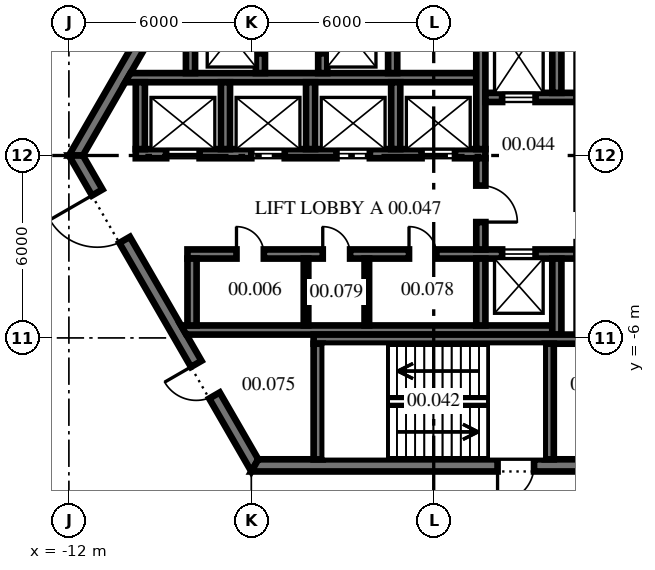
"""IFC4 building model, lengths in metres.
Left out: names, types, materials, properties, quantities, classifications, styles, units other than length and angle.
Written with IfcOpenShell. Run it as: python <this file> out.ifc"""

import sys

from ifc_helpers import new_model, si_unit, direction, frame, frame_2d, origin, place, context, subcontext, project, spatial, polyline, rectangle, outline, extrude, source, transform, mapped, element, fill, save


model = new_model("IFC4")
c1 = context("Model", 3, precision=1e-05, world=origin(), true_north=direction((0.0, 1.0)))
c2 = subcontext(c1, "Body", "Model", "MODEL_VIEW")
j1 = project(units=[si_unit("LENGTHUNIT", "METRE"), si_unit("PLANEANGLEUNIT", "RADIAN")], contexts=[c1])
p1 = place(None, origin())
s1 = spatial("IfcSite", under=j1, at=p1, CompositionType="ELEMENT")
p2 = place(p1, origin())
s2 = spatial("IfcBuilding", under=s1, at=p2, CompositionType="ELEMENT")
p3 = place(p2, origin())
s3 = spatial("IfcBuildingStorey", under=s2, at=p3, CompositionType="ELEMENT", Elevation=0.0)
m1 = source(origin(), c2, "Body", "SweptSolid", [
    extrude(outline(polyline([(-0.115, -0.2), (11.885, -0.2), (11.654, 0.2), (0.115, 0.2), (-0.115, -0.2)])), origin(), (0.0, 0.0, 1.0), 7.0),
])
p4 = place(p3, frame((-5.885, 10.192, -0.2), z_axis=(0.0, 0.0, 1.0), x_axis=(-0.499996592174, -0.866027371285, 0.0)))
e1 = element("IfcWall", 1, at=p4, inside=s3, PredefinedType="SHEAR", context=c2, shape_type="MappedRepresentation", body=[
    mapped(m1, transform((0.0, 0.0, 0.0), scale=1.0)),
])
p5 = place(p4, frame((3.185, 0.0, 0.2)))
e2 = element("IfcOpeningElement", 2, at=p5, cuts=e1, PredefinedType="OPENING", context=c2, shape_type="SweptSolid", body=[
    extrude(rectangle(XDim=1.2, YDim=2.1, at=frame_2d((0.6, 1.05))), frame((0.0, 0.21, 0.0), z_axis=(0.0, -1.0, 0.0), x_axis=(1.0, 0.0, 0.0)), (0.0, 0.0, 1.0), 0.42),
])
p6 = place(p3, frame((-11.769, 0.0, -0.2), z_axis=(0.0, 0.0, 1.0), x_axis=(0.499996592174, -0.866027371285, 0.0)))
e3 = element("IfcWall", 3, at=p6, inside=s3, PredefinedType="SHEAR", context=c2, shape_type="MappedRepresentation", body=[
    mapped(m1, transform((0.0, 0.0, 0.0), scale=1.0)),
])
p7 = place(p6, frame((1.405, 0.0, 0.2)))
e4 = element("IfcOpeningElement", 4, at=p7, cuts=e3, PredefinedType="OPENING", context=c2, shape_type="SweptSolid", body=[
    extrude(rectangle(XDim=1.8, YDim=2.1, at=frame_2d((0.9, 1.05))), frame((0.0, 0.21, 0.0), z_axis=(0.0, -1.0, 0.0), x_axis=(1.0, 0.0, 0.0)), (0.0, 0.0, 1.0), 0.42),
])
p8 = place(p6, frame((7.915, 0.0, 0.2)))
e5 = element("IfcOpeningElement", 5, at=p8, cuts=e3, PredefinedType="OPENING", context=c2, shape_type="SweptSolid", body=[
    extrude(rectangle(XDim=1.2, YDim=2.1, at=frame_2d((0.6, 1.05))), frame((0.0, 0.21, 0.0), z_axis=(0.0, -1.0, 0.0), x_axis=(1.0, 0.0, 0.0)), (0.0, 0.0, 1.0), 0.42),
])
p9 = place(p3, frame((-5.885, -10.192, -0.2), z_axis=(0.0, 0.0, 1.0), x_axis=(1.0, 0.0, 0.0)))
e6 = element("IfcWall", 6, at=p9, inside=s3, PredefinedType="SHEAR", context=c2, shape_type="MappedRepresentation", body=[
    mapped(m1, transform((0.0, 0.0, 0.0), scale=1.0)),
])
p10 = place(p9, frame((7.985, 0.0, 0.2)))
e7 = element("IfcOpeningElement", 7, at=p10, cuts=e6, PredefinedType="OPENING", context=c2, shape_type="SweptSolid", body=[
    extrude(rectangle(XDim=1.2, YDim=2.1, at=frame_2d((0.6, 1.05))), frame((0.0, 0.21, 0.0), z_axis=(0.0, -1.0, 0.0), x_axis=(1.0, 0.0, 0.0)), (0.0, 0.0, 1.0), 0.42),
])
p11 = place(p3, frame((-9.8, 0.06, -0.2), z_axis=(0.0, 0.0, 1.0), x_axis=(1.0, 0.0, 0.0)))
e8 = element("IfcWall", 8, at=p11, inside=s3, PredefinedType="SHEAR", context=c2, shape_type="SweptSolid", body=[
    extrude(rectangle(XDim=11.5, YDim=0.3, at=frame_2d((5.75, 0.0))), origin(), (0.0, 0.0, 1.0), 7.0),
])
p12 = place(p11, frame((1.0, 0.0, 0.2)))
e9 = element("IfcOpeningElement", 9, at=p12, cuts=e8, PredefinedType="OPENING", context=c2, shape_type="SweptSolid", body=[
    extrude(rectangle(XDim=1.1, YDim=2.1, at=frame_2d((0.55, 1.05))), frame((0.0, 0.16, 0.0), z_axis=(0.0, -1.0, 0.0), x_axis=(1.0, 0.0, 0.0)), (0.0, 0.0, 1.0), 0.32),
])
p13 = place(p11, frame((3.8, 0.0, 0.2)))
e10 = element("IfcOpeningElement", 10, at=p13, cuts=e8, PredefinedType="OPENING", context=c2, shape_type="SweptSolid", body=[
    extrude(rectangle(XDim=1.1, YDim=2.1, at=frame_2d((0.55, 1.05))), frame((0.0, 0.16, 0.0), z_axis=(0.0, -1.0, 0.0), x_axis=(1.0, 0.0, 0.0)), (0.0, 0.0, 1.0), 0.32),
])
p14 = place(p11, frame((6.6, 0.0, 0.2)))
e11 = element("IfcOpeningElement", 11, at=p14, cuts=e8, PredefinedType="OPENING", context=c2, shape_type="SweptSolid", body=[
    extrude(rectangle(XDim=1.1, YDim=2.1, at=frame_2d((0.55, 1.05))), frame((0.0, 0.16, 0.0), z_axis=(0.0, -1.0, 0.0), x_axis=(1.0, 0.0, 0.0)), (0.0, 0.0, 1.0), 0.32),
])
p15 = place(p11, frame((9.4, 0.0, 0.2)))
e12 = element("IfcOpeningElement", 12, at=p15, cuts=e8, PredefinedType="OPENING", context=c2, shape_type="SweptSolid", body=[
    extrude(rectangle(XDim=1.1, YDim=2.1, at=frame_2d((0.55, 1.05))), frame((0.0, 0.16, 0.0), z_axis=(0.0, -1.0, 0.0), x_axis=(1.0, 0.0, 0.0)), (0.0, 0.0, 1.0), 0.32),
])
p16 = place(p3, frame((-9.8, 2.56, -0.2), z_axis=(0.0, 0.0, 1.0), x_axis=(1.0, 0.0, 0.0)))
e13 = element("IfcWall", 13, at=p16, inside=s3, PredefinedType="SHEAR", context=c2, shape_type="SweptSolid", body=[
    extrude(outline(polyline([(11.2, -0.15), (-0.349, -0.15), (-0.176, 0.15), (11.2, 0.15), (11.2, -0.15)])), origin(), (0.0, 0.0, 1.0), 7.0),
])
p17 = place(p3, frame((1.55, 0.21, -0.2), z_axis=(0.0, 0.0, 1.0), x_axis=(0.0, 1.0, 0.0)))
e14 = element("IfcWall", 14, at=p17, inside=s3, PredefinedType="SHEAR", context=c2, shape_type="SweptSolid", body=[
    extrude(rectangle(XDim=4.45, YDim=0.3, at=frame_2d((2.225, 0.0))), origin(), (0.0, 0.0, 1.0), 7.0),
])
m2 = source(origin(), c2, "Body", "SweptSolid", [
    extrude(rectangle(XDim=3.0, YDim=0.3, at=frame_2d((1.5, 0.0))), origin(), (0.0, 0.0, 1.0), 7.0),
])
p18 = place(p3, frame((1.7, 1.91, -0.2), z_axis=(0.0, 0.0, 1.0), x_axis=(1.0, 0.0, 0.0)))
e15 = element("IfcWall", 15, at=p18, inside=s3, PredefinedType="SHEAR", context=c2, shape_type="MappedRepresentation", body=[
    mapped(m2, transform((0.0, 0.0, 0.0), scale=1.0)),
])
p19 = place(p18, frame((0.55, 0.0, 0.2)))
e16 = element("IfcOpeningElement", 16, at=p19, cuts=e15, PredefinedType="OPENING", context=c2, shape_type="SweptSolid", body=[
    extrude(rectangle(XDim=1.1, YDim=2.1, at=frame_2d((0.55, 1.05))), frame((0.0, 0.16, 0.0), z_axis=(0.0, -1.0, 0.0), x_axis=(1.0, 0.0, 0.0)), (0.0, 0.0, 1.0), 0.32),
])
p20 = place(p3, frame((4.05, 2.06, -0.2), z_axis=(0.0, 0.0, 1.0), x_axis=(0.0, 1.0, 0.0)))
e17 = element("IfcWall", 17, at=p20, inside=s3, PredefinedType="SHEAR", context=c2, shape_type="SweptSolid", body=[
    extrude(rectangle(XDim=2.9, YDim=0.3, at=frame_2d((1.45, 0.0))), origin(), (0.0, 0.0, 1.0), 7.0),
])
p21 = place(p3, frame((-8.1, -3.24, -0.2), z_axis=(0.0, 0.0, 1.0), x_axis=(1.0, 0.0, 0.0)))
e18 = element("IfcWall", 18, at=p21, inside=s3, PredefinedType="SHEAR", context=c2, shape_type="SweptSolid", body=[
    extrude(rectangle(XDim=12.8, YDim=0.3, at=frame_2d((6.4, 0.0))), origin(), (0.0, 0.0, 1.0), 7.0),
])
p22 = place(p21, frame((1.613, 0.0, 0.2)))
e19 = element("IfcOpeningElement", 19, at=p22, cuts=e18, PredefinedType="OPENING", context=c2, shape_type="SweptSolid", body=[
    extrude(rectangle(XDim=0.9, YDim=2.1, at=frame_2d((0.45, 1.05))), frame((0.0, 0.16, 0.0), z_axis=(0.0, -1.0, 0.0), x_axis=(1.0, 0.0, 0.0)), (0.0, 0.0, 1.0), 0.32),
])
p23 = place(p21, frame((4.45, 0.0, 0.2)))
e20 = element("IfcOpeningElement", 20, at=p23, cuts=e18, PredefinedType="OPENING", context=c2, shape_type="SweptSolid", body=[
    extrude(rectangle(XDim=0.9, YDim=2.1, at=frame_2d((0.45, 1.05))), frame((0.0, 0.16, 0.0), z_axis=(0.0, -1.0, 0.0), x_axis=(1.0, 0.0, 0.0)), (0.0, 0.0, 1.0), 0.32),
])
p24 = place(p21, frame((7.288, 0.0, 0.2)))
e21 = element("IfcOpeningElement", 21, at=p24, cuts=e18, PredefinedType="OPENING", context=c2, shape_type="SweptSolid", body=[
    extrude(rectangle(XDim=0.9, YDim=2.1, at=frame_2d((0.45, 1.05))), frame((0.0, 0.16, 0.0), z_axis=(0.0, -1.0, 0.0), x_axis=(1.0, 0.0, 0.0)), (0.0, 0.0, 1.0), 0.32),
])
p25 = place(p21, frame((10.35, 0.0, 0.2)))
e22 = element("IfcOpeningElement", 22, at=p25, cuts=e18, PredefinedType="OPENING", context=c2, shape_type="SweptSolid", body=[
    extrude(rectangle(XDim=1.1, YDim=2.1, at=frame_2d((0.55, 1.05))), frame((0.0, 0.16, 0.0), z_axis=(0.0, -1.0, 0.0), x_axis=(1.0, 0.0, 0.0)), (0.0, 0.0, 1.0), 0.32),
])
p26 = place(p3, frame((-8.1, -5.74, -0.2), z_axis=(0.0, 0.0, 1.0), x_axis=(1.0, 0.0, 0.0)))
e23 = element("IfcWall", 23, at=p26, inside=s3, PredefinedType="SHEAR", context=c2, shape_type="SweptSolid", body=[
    extrude(outline(polyline([(12.0, -0.15), (-0.04, -0.15), (-0.213, 0.15), (12.0, 0.15), (12.0, -0.15)])), origin(), (0.0, 0.0, 1.0), 7.0),
])
m3 = source(origin(), c2, "Body", "SweptSolid", [
    extrude(rectangle(XDim=2.2, YDim=0.3, at=frame_2d((1.1, 0.0))), origin(), (0.0, 0.0, 1.0), 7.0),
])
p27 = place(p3, frame((-7.95, -5.59, -0.2), z_axis=(0.0, 0.0, 1.0), x_axis=(0.0, 1.0, 0.0)))
e24 = element("IfcWall", 24, at=p27, inside=s3, PredefinedType="SHEAR", context=c2, shape_type="MappedRepresentation", body=[
    mapped(m3, transform((0.0, 0.0, 0.0), scale=1.0)),
])
m4 = source(origin(), c2, "Body", "SweptSolid", [
    extrude(rectangle(XDim=2.2, YDim=0.3, at=frame_2d((1.1, 0.0))), origin(), (0.0, 0.0, 1.0), 7.0),
])
p28 = place(p3, frame((-9.65, 0.21, -0.2), z_axis=(0.0, 0.0, 1.0), x_axis=(0.0, 1.0, 0.0)))
e25 = element("IfcWall", 25, at=p28, inside=s3, PredefinedType="SHEAR", context=c2, shape_type="MappedRepresentation", body=[
    mapped(m4, transform((0.0, 0.0, 0.0), scale=1.0)),
])
p29 = place(p3, frame((1.55, -5.59, -0.2), z_axis=(0.0, 0.0, 1.0), x_axis=(0.0, 1.0, 0.0)))
e26 = element("IfcWall", 26, at=p29, inside=s3, PredefinedType="SHEAR", context=c2, shape_type="MappedRepresentation", body=[
    mapped(m3, transform((0.0, 0.0, 0.0), scale=1.0)),
])
m5 = source(origin(), c2, "Body", "SweptSolid", [
    extrude(rectangle(XDim=2.5, YDim=0.3, at=frame_2d((1.25, 0.0))), origin(), (0.0, 0.0, 1.0), 7.0),
])
p30 = place(p3, frame((4.05, -5.89, -0.2), z_axis=(0.0, 0.0, 1.0), x_axis=(0.0, 1.0, 0.0)))
e27 = element("IfcWall", 27, at=p30, inside=s3, PredefinedType="SHEAR", context=c2, shape_type="MappedRepresentation", body=[
    mapped(m5, transform((0.0, 0.0, 0.0), scale=1.0)),
])
p31 = place(p3, frame((1.55, -3.09, -0.2), z_axis=(0.0, 0.0, 1.0), x_axis=(0.0, 1.0, 0.0)))
e28 = element("IfcWall", 28, at=p31, inside=s3, PredefinedType="SHEAR", context=c2, shape_type="MappedRepresentation", body=[
    mapped(m2, transform((0.0, 0.0, 0.0), scale=1.0)),
])
p32 = place(p31, frame((0.9, 0.0, 0.2)))
e29 = element("IfcOpeningElement", 29, at=p32, cuts=e28, PredefinedType="OPENING", context=c2, shape_type="SweptSolid", body=[
    extrude(rectangle(XDim=1.2, YDim=2.1, at=frame_2d((0.6, 1.05))), frame((0.0, 0.16, 0.0), z_axis=(0.0, -1.0, 0.0), x_axis=(1.0, 0.0, 0.0)), (0.0, 0.0, 1.0), 0.32),
])
p33 = place(p3, frame((-3.95, -6.04, -0.2), z_axis=(0.0, 0.0, 1.0), x_axis=(1.0, 0.0, 0.0)))
e30 = element("IfcWall", 30, at=p33, inside=s3, PredefinedType="SHEAR", context=c2, shape_type="SweptSolid", body=[
    extrude(outline(polyline([(0.0, -0.15), (8.95, -0.15), (8.65, 0.15), (0.0, 0.15), (0.0, -0.15)])), origin(), (0.0, 0.0, 1.0), 7.0),
])
m6 = source(origin(), c2, "Body", "SweptSolid", [
    extrude(outline(polyline([(3.8, -0.15), (-0.004, -0.15), (-0.004, 0.15), (3.8, 0.15), (3.8, -0.15)])), origin(), (0.0, 0.0, 1.0), 7.0),
])
for number, where, z_axis, x_axis in (
    (31, (-3.8, -9.99, -0.2), (0.0, 0.0, 1.0), (0.0, 1.0, 0.0)),
    (32, (3.8, -9.99, -0.2), (0.0, 0.0, 1.0), (0.0, 1.0, 0.0)),
):
    element("IfcWall", number, at=place(p3, frame(where, z_axis=z_axis, x_axis=x_axis)), inside=s3, PredefinedType="SHEAR", context=c2, shape_type="MappedRepresentation", body=[
        mapped(m6, transform((0.0, 0.0, 0.0), scale=1.0)),
    ])
m7 = source(origin(), c2, "Body", "SweptSolid", [
    extrude(rectangle(XDim=2.4, YDim=0.3, at=frame_2d((1.2, 0.0))), origin(), (0.0, 0.0, 1.0), 7.0),
])
p34 = place(p3, frame((-8.0, 2.71, -0.2), z_axis=(0.0, 0.0, 1.0), x_axis=(0.0, 1.0, 0.0)))
e33 = element("IfcWall", 33, at=p34, inside=s3, PredefinedType="SHEAR", context=c2, shape_type="MappedRepresentation", body=[
    mapped(m7, transform((0.0, 0.0, 0.0), scale=1.0)),
])
p35 = place(p3, frame((-5.7, 2.71, -0.2), z_axis=(0.0, 0.0, 1.0), x_axis=(0.0, 1.0, 0.0)))
e34 = element("IfcWall", 34, at=p35, inside=s3, PredefinedType="SHEAR", context=c2, shape_type="MappedRepresentation", body=[
    mapped(m7, transform((0.0, 0.0, 0.0), scale=1.0)),
])
p36 = place(p35, frame((0.65, 0.0, 0.2)))
e35 = element("IfcOpeningElement", 35, at=p36, cuts=e34, PredefinedType="OPENING", context=c2, shape_type="SweptSolid", body=[
    extrude(rectangle(XDim=1.1, YDim=2.1, at=frame_2d((0.55, 1.05))), frame((0.0, 0.16, 0.0), z_axis=(0.0, -1.0, 0.0), x_axis=(1.0, 0.0, 0.0)), (0.0, 0.0, 1.0), 0.32),
])
p37 = place(p3, frame((-3.65, 2.71, -0.2), z_axis=(0.0, 0.0, 1.0), x_axis=(0.0, 1.0, 0.0)))
e36 = element("IfcWall", 36, at=p37, inside=s3, PredefinedType="SHEAR", context=c2, shape_type="MappedRepresentation", body=[
    mapped(m7, transform((0.0, 0.0, 0.0), scale=1.0)),
])
p38 = place(p37, frame((0.65, 0.0, 0.2)))
e37 = element("IfcOpeningElement", 37, at=p38, cuts=e36, PredefinedType="OPENING", context=c2, shape_type="SweptSolid", body=[
    extrude(rectangle(XDim=1.1, YDim=2.1, at=frame_2d((0.55, 1.05))), frame((0.0, 0.16, 0.0), z_axis=(0.0, -1.0, 0.0), x_axis=(1.0, 0.0, 0.0)), (0.0, 0.0, 1.0), 0.32),
])
p39 = place(p3, frame((-1.35, 2.71, -0.2), z_axis=(0.0, 0.0, 1.0), x_axis=(0.0, 1.0, 0.0)))
e38 = element("IfcWall", 38, at=p39, inside=s3, PredefinedType="SHEAR", context=c2, shape_type="MappedRepresentation", body=[
    mapped(m7, transform((0.0, 0.0, 0.0), scale=1.0)),
])
for number, where, z_axis, x_axis in (
    (39, (-6.85, 0.21, -0.2), (0.0, 0.0, 1.0), (0.0, 1.0, 0.0)),
    (40, (-4.05, 0.21, -0.2), (0.0, 0.0, 1.0), (0.0, 1.0, 0.0)),
    (41, (-1.25, 0.21, -0.2), (0.0, 0.0, 1.0), (0.0, 1.0, 0.0)),
):
    element("IfcWall", number, at=place(p3, frame(where, z_axis=z_axis, x_axis=x_axis)), inside=s3, PredefinedType="SHEAR", context=c2, shape_type="MappedRepresentation", body=[
        mapped(m4, transform((0.0, 0.0, 0.0), scale=1.0)),
    ])
m8 = source(origin(), c2, "Body", "SweptSolid", [
    extrude(rectangle(XDim=2.2, YDim=0.15, at=frame_2d((1.1, 0.0))), origin(), (0.0, 0.0, 1.0), 6.8),
])
for number, where, z_axis, x_axis in (
    (42, (-4.2, -5.59, 0.0), (0.0, 0.0, 1.0), (0.0, 1.0, 0.0)),
    (43, (-2.2, -5.59, 0.0), (0.0, 0.0, 1.0), (0.0, 1.0, 0.0)),
):
    element("IfcWall", number, at=place(p3, frame(where, z_axis=z_axis, x_axis=x_axis)), inside=s3, PredefinedType="PARTITIONING", context=c2, shape_type="MappedRepresentation", body=[
        mapped(m8, transform((0.0, 0.0, 0.0), scale=1.0)),
    ])
p40 = place(p3, frame((-14.969, -9.858, 0.0), z_axis=(0.0, 0.0, 1.0), x_axis=(0.500003393015, -0.866023444818, 0.0)))
e44 = element("IfcWall", 44, at=p40, inside=s3, PredefinedType="PARTITIONING", context=c2, shape_type="SweptSolid", body=[
    extrude(rectangle(XDim=9.228, YDim=0.2, at=frame_2d((4.614, 0.0))), origin(), (0.0, 0.0, 1.0), 6.8),
])
p41 = place(p40, frame((4.094, 0.0, 0.0)))
e45 = element("IfcOpeningElement", 45, at=p41, cuts=e44, PredefinedType="OPENING", context=c2, shape_type="SweptSolid", body=[
    extrude(rectangle(XDim=0.9, YDim=2.1, at=frame_2d((0.45, 1.05))), frame((0.0, 0.11, 0.0), z_axis=(0.0, -1.0, 0.0), x_axis=(1.0, 0.0, 0.0)), (0.0, 0.0, 1.0), 0.22),
])
p42 = place(p3, frame((-20.66, 0.0, 0.0), z_axis=(0.0, 0.0, 1.0), x_axis=(0.500006476997, 0.866021664256, 0.0)))
e46 = element("IfcWall", 46, at=p42, inside=s3, PredefinedType="PARTITIONING", context=c2, shape_type="SweptSolid", body=[
    extrude(rectangle(XDim=20.66, YDim=0.15, at=frame_2d((10.33, 0.0))), origin(), (0.0, 0.0, 1.0), 6.8),
])
p43 = place(p42, frame((15.51, 0.0, 0.0)))
e47 = element("IfcOpeningElement", 47, at=p43, cuts=e46, PredefinedType="OPENING", context=c2, shape_type="SweptSolid", body=[
    extrude(rectangle(XDim=0.9, YDim=2.1, at=frame_2d((0.45, 1.05))), frame((0.0, 0.085, 0.0), z_axis=(0.0, -1.0, 0.0), x_axis=(1.0, 0.0, 0.0)), (0.0, 0.0, 1.0), 0.17),
])
p44 = place(p42, frame((6.076, 0.0, 0.0)))
e48 = element("IfcOpeningElement", 48, at=p44, cuts=e46, PredefinedType="OPENING", context=c2, shape_type="SweptSolid", body=[
    extrude(rectangle(XDim=0.9, YDim=2.1, at=frame_2d((0.45, 1.05))), frame((0.0, 0.085, 0.0), z_axis=(0.0, -1.0, 0.0), x_axis=(1.0, 0.0, 0.0)), (0.0, 0.0, 1.0), 0.17),
])
p45 = place(p42, frame((0.442, 0.0, 0.0)))
e49 = element("IfcOpeningElement", 49, at=p45, cuts=e46, PredefinedType="OPENING", context=c2, shape_type="SweptSolid", body=[
    extrude(rectangle(XDim=0.9, YDim=2.1, at=frame_2d((0.45, 1.05))), frame((0.0, 0.085, 0.0), z_axis=(0.0, -1.0, 0.0), x_axis=(1.0, 0.0, 0.0)), (0.0, 0.0, 1.0), 0.17),
])
p46 = place(p10, frame((1.2, 0.0, 0.0), z_axis=(0.0, 0.0, 1.0), x_axis=(-1.0, 0.0, 0.0)))
e50 = element("IfcDoor", 50, at=p46, inside=s3, OperationType="SINGLE_SWING_RIGHT", PredefinedType="DOOR", context=c2, shape_type="SweptSolid", body=[
    extrude(rectangle(XDim=1.2, YDim=2.1, at=frame_2d((0.6, 1.05))), frame((0.0, 0.025, 0.0), z_axis=(0.0, -1.0, 0.0), x_axis=(1.0, 0.0, 0.0)), (0.0, 0.0, 1.0), 0.05),
])
fill(e7, e50)
p47 = place(p7, frame((1.8, 0.0, 0.0), z_axis=(0.0, 0.0, 1.0), x_axis=(-1.0, 0.0, 0.0)))
e51 = element("IfcDoor", 51, at=p47, inside=s3, OperationType="DOUBLE_DOOR_DOUBLE_SWING", PredefinedType="DOOR", context=c2, shape_type="SweptSolid", body=[
    extrude(rectangle(XDim=1.8, YDim=2.1, at=frame_2d((0.9, 1.05))), frame((0.0, 0.025, 0.0), z_axis=(0.0, -1.0, 0.0), x_axis=(1.0, 0.0, 0.0)), (0.0, 0.0, 1.0), 0.05),
])
fill(e4, e51)
p48 = place(p8, frame((1.2, 0.0, 0.0), z_axis=(0.0, 0.0, 1.0), x_axis=(-1.0, 0.0, 0.0)))
e52 = element("IfcDoor", 52, at=p48, inside=s3, OperationType="SINGLE_SWING_RIGHT", PredefinedType="DOOR", context=c2, shape_type="SweptSolid", body=[
    extrude(rectangle(XDim=1.2, YDim=2.1, at=frame_2d((0.6, 1.05))), frame((0.0, 0.025, 0.0), z_axis=(0.0, -1.0, 0.0), x_axis=(1.0, 0.0, 0.0)), (0.0, 0.0, 1.0), 0.05),
])
fill(e5, e52)
p49 = place(p32, frame((1.2, 0.0, 0.0), z_axis=(0.0, 0.0, 1.0), x_axis=(-1.0, 0.0, 0.0)))
e53 = element("IfcDoor", 53, at=p49, inside=s3, OperationType="SINGLE_SWING_RIGHT", PredefinedType="DOOR", context=c2, shape_type="SweptSolid", body=[
    extrude(rectangle(XDim=1.2, YDim=2.1, at=frame_2d((0.6, 1.05))), frame((0.0, 0.025, 0.0), z_axis=(0.0, -1.0, 0.0), x_axis=(1.0, 0.0, 0.0)), (0.0, 0.0, 1.0), 0.05),
])
fill(e29, e53)
p50 = place(p22, origin())
e54 = element("IfcDoor", 54, at=p50, inside=s3, OperationType="SINGLE_SWING_LEFT", PredefinedType="DOOR", context=c2, shape_type="SweptSolid", body=[
    extrude(rectangle(XDim=0.9, YDim=2.1, at=frame_2d((0.45, 1.05))), frame((0.0, 0.025, 0.0), z_axis=(0.0, -1.0, 0.0), x_axis=(1.0, 0.0, 0.0)), (0.0, 0.0, 1.0), 0.05),
])
fill(e19, e54)
p51 = place(p23, origin())
e55 = element("IfcDoor", 55, at=p51, inside=s3, OperationType="SINGLE_SWING_LEFT", PredefinedType="DOOR", context=c2, shape_type="SweptSolid", body=[
    extrude(rectangle(XDim=0.9, YDim=2.1, at=frame_2d((0.45, 1.05))), frame((0.0, 0.025, 0.0), z_axis=(0.0, -1.0, 0.0), x_axis=(1.0, 0.0, 0.0)), (0.0, 0.0, 1.0), 0.05),
])
fill(e20, e55)
p52 = place(p24, origin())
e56 = element("IfcDoor", 56, at=p52, inside=s3, OperationType="SINGLE_SWING_LEFT", PredefinedType="DOOR", context=c2, shape_type="SweptSolid", body=[
    extrude(rectangle(XDim=0.9, YDim=2.1, at=frame_2d((0.45, 1.05))), frame((0.0, 0.025, 0.0), z_axis=(0.0, -1.0, 0.0), x_axis=(1.0, 0.0, 0.0)), (0.0, 0.0, 1.0), 0.05),
])
fill(e21, e56)
p53 = place(p12, origin())
e57 = element("IfcDoor", 57, at=p53, inside=s3, OperationType="DOUBLE_DOOR_SLIDING", PredefinedType="DOOR", context=c2, shape_type="SweptSolid", body=[
    extrude(rectangle(XDim=1.1, YDim=2.1, at=frame_2d((0.55, 1.05))), frame((0.0, 0.025, 0.0), z_axis=(0.0, -1.0, 0.0), x_axis=(1.0, 0.0, 0.0)), (0.0, 0.0, 1.0), 0.05),
])
fill(e9, e57)
p54 = place(p13, origin())
e58 = element("IfcDoor", 58, at=p54, inside=s3, OperationType="DOUBLE_DOOR_SLIDING", PredefinedType="DOOR", context=c2, shape_type="SweptSolid", body=[
    extrude(rectangle(XDim=1.1, YDim=2.1, at=frame_2d((0.55, 1.05))), frame((0.0, 0.025, 0.0), z_axis=(0.0, -1.0, 0.0), x_axis=(1.0, 0.0, 0.0)), (0.0, 0.0, 1.0), 0.05),
])
fill(e10, e58)
p55 = place(p14, origin())
e59 = element("IfcDoor", 59, at=p55, inside=s3, OperationType="DOUBLE_DOOR_SLIDING", PredefinedType="DOOR", context=c2, shape_type="SweptSolid", body=[
    extrude(rectangle(XDim=1.1, YDim=2.1, at=frame_2d((0.55, 1.05))), frame((0.0, 0.025, 0.0), z_axis=(0.0, -1.0, 0.0), x_axis=(1.0, 0.0, 0.0)), (0.0, 0.0, 1.0), 0.05),
])
fill(e11, e59)
p56 = place(p15, origin())
e60 = element("IfcDoor", 60, at=p56, inside=s3, OperationType="DOUBLE_DOOR_SLIDING", PredefinedType="DOOR", context=c2, shape_type="SweptSolid", body=[
    extrude(rectangle(XDim=1.1, YDim=2.1, at=frame_2d((0.55, 1.05))), frame((0.0, 0.025, 0.0), z_axis=(0.0, -1.0, 0.0), x_axis=(1.0, 0.0, 0.0)), (0.0, 0.0, 1.0), 0.05),
])
fill(e12, e60)
p57 = place(p19, origin())
e61 = element("IfcDoor", 61, at=p57, inside=s3, OperationType="DOUBLE_DOOR_SLIDING", PredefinedType="DOOR", context=c2, shape_type="SweptSolid", body=[
    extrude(rectangle(XDim=1.1, YDim=2.1, at=frame_2d((0.55, 1.05))), frame((0.0, 0.025, 0.0), z_axis=(0.0, -1.0, 0.0), x_axis=(1.0, 0.0, 0.0)), (0.0, 0.0, 1.0), 0.05),
])
fill(e16, e61)
p58 = place(p25, origin())
e62 = element("IfcDoor", 62, at=p58, inside=s3, OperationType="DOUBLE_DOOR_SLIDING", PredefinedType="DOOR", context=c2, shape_type="SweptSolid", body=[
    extrude(rectangle(XDim=1.1, YDim=2.1, at=frame_2d((0.55, 1.05))), frame((0.0, 0.025, 0.0), z_axis=(0.0, -1.0, 0.0), x_axis=(1.0, 0.0, 0.0)), (0.0, 0.0, 1.0), 0.05),
])
fill(e22, e62)
p59 = place(p36, origin())
e63 = element("IfcDoor", 63, at=p59, inside=s3, OperationType="DOUBLE_DOOR_SLIDING", PredefinedType="DOOR", context=c2, shape_type="SweptSolid", body=[
    extrude(rectangle(XDim=1.1, YDim=2.1, at=frame_2d((0.55, 1.05))), frame((0.0, 0.025, 0.0), z_axis=(0.0, -1.0, 0.0), x_axis=(1.0, 0.0, 0.0)), (0.0, 0.0, 1.0), 0.05),
])
fill(e35, e63)
p60 = place(p38, origin())
e64 = element("IfcDoor", 64, at=p60, inside=s3, OperationType="DOUBLE_DOOR_SLIDING", PredefinedType="DOOR", context=c2, shape_type="SweptSolid", body=[
    extrude(rectangle(XDim=1.1, YDim=2.1, at=frame_2d((0.55, 1.05))), frame((0.0, 0.025, 0.0), z_axis=(0.0, -1.0, 0.0), x_axis=(1.0, 0.0, 0.0)), (0.0, 0.0, 1.0), 0.05),
])
fill(e37, e64)
save(model, sys.argv[1])
